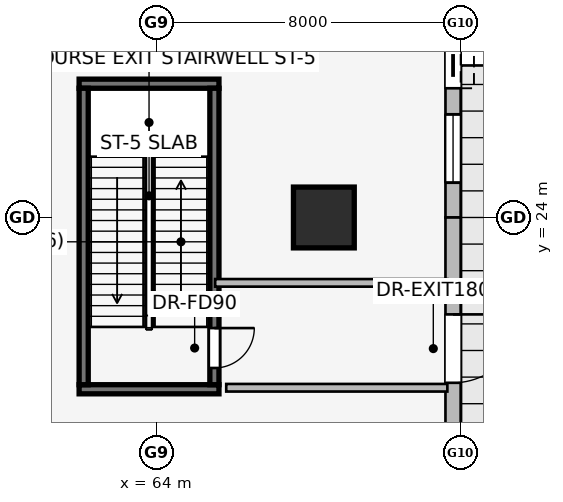
"""IFC4 building model, lengths in metres.
Left out: names, types, materials, properties, quantities, classifications, styles, units other than length and angle.
Written with IfcOpenShell. Run it as: python <this file> out.ifc"""

import sys

from ifc_helpers import new_model, si_unit, direction, frame, frame_2d, origin, origin_2d, place, context, subcontext, project, spatial, rectangle, extrude, element, fill, save


model = new_model("IFC4")
c1 = context("Model", 3, precision=1e-05, world=origin(), true_north=direction((0.0, 1.0)))
c2 = subcontext(c1, "Body", "Model", "MODEL_VIEW")
j1 = project(units=[si_unit("LENGTHUNIT", "METRE"), si_unit("PLANEANGLEUNIT", "RADIAN")], contexts=[c1])
p1 = place(None, origin())
s1 = spatial("IfcSite", under=j1, at=p1, CompositionType="ELEMENT")
p2 = place(p1, origin())
s2 = spatial("IfcBuilding", under=s1, at=p2, CompositionType="ELEMENT")
p3 = place(p2, origin())
s3 = spatial("IfcBuildingStorey", under=s2, at=p3, CompositionType="ELEMENT", Elevation=0.0)
for number, where, z_axis, x_axis in (
    (1, (61.96, 19.48, 0.0), (0.0, 0.0, 1.0), (1.0, 0.0, 0.0)),
    (2, (65.64, 27.52, 0.0), (0.0, 0.0, 1.0), (-1.0, 0.0, 0.0)),
):
    element("IfcWall", number, at=place(p3, frame(where, z_axis=z_axis, x_axis=x_axis)), inside=s3, PredefinedType="SHEAR", context=c2, shape_type="SweptSolid", body=[
        extrude(rectangle(XDim=3.68, YDim=0.24, at=frame_2d((1.84, 0.0))), origin(), (0.0, 0.0, 1.0), 6.0),
    ])
p4 = place(p3, frame((62.08, 27.4, 0.0), z_axis=(0.0, 0.0, 1.0), x_axis=(0.0, -1.0, 0.0)))
e3 = element("IfcWall", 3, at=p4, inside=s3, PredefinedType="SHEAR", context=c2, shape_type="SweptSolid", body=[
    extrude(rectangle(XDim=7.8, YDim=0.24, at=frame_2d((3.9, 0.0))), origin(), (0.0, 0.0, 1.0), 6.0),
])
p5 = place(p3, frame((65.52, 27.4, 0.0), z_axis=(0.0, 0.0, 1.0), x_axis=(0.0, -1.0, 0.0)))
e4 = element("IfcWall", 4, at=p5, inside=s3, PredefinedType="SHEAR", context=c2, shape_type="SweptSolid", body=[
    extrude(rectangle(XDim=7.8, YDim=0.24, at=frame_2d((3.9, 0.0))), origin(), (0.0, 0.0, 1.0), 6.0),
])
p6 = place(p5, frame((6.31, 0.0, 0.0)))
e5 = element("IfcOpeningElement", 5, at=p6, cuts=e4, PredefinedType="OPENING", context=c2, shape_type="SweptSolid", body=[
    extrude(rectangle(XDim=1.05, YDim=2.0, at=frame_2d((0.525, 1.0))), frame((0.0, 0.13, 0.0), z_axis=(0.0, -1.0, 0.0), x_axis=(1.0, 0.0, 0.0)), (0.0, 0.0, 1.0), 0.26),
])
p7 = place(p3, frame((68.4, 24.0, 0.0), z_axis=(0.0, 0.0, 1.0), x_axis=(1.0, 0.0, 0.0)))
e6 = element("IfcColumn", 6, at=p7, inside=s3, PredefinedType="COLUMN", context=c2, shape_type="SweptSolid", body=[
    extrude(rectangle(XDim=1.6, YDim=1.6, at=origin_2d()), origin(), (0.0, 0.0, 1.0), 6.0),
])
p8 = place(p3, frame((71.8, 47.6, 0.0), z_axis=(0.0, 0.0, 1.0), x_axis=(0.0, -1.0, 0.0)))
e7 = element("IfcWall", 7, at=p8, inside=s3, PredefinedType="STANDARD", context=c2, shape_type="SweptSolid", body=[
    extrude(rectangle(XDim=23.6, YDim=0.4, at=frame_2d((11.8, 0.0))), origin(), (0.0, 0.0, 1.0), 5.69),
])
p9 = place(p8, frame((16.6, 0.0, 0.0)))
e8 = element("IfcOpeningElement", 8, at=p9, cuts=e7, PredefinedType="OPENING", context=c2, shape_type="SweptSolid", body=[
    extrude(rectangle(XDim=3.6, YDim=3.6, at=frame_2d((1.8, 1.8))), frame((0.0, 0.21, 0.0), z_axis=(0.0, -1.0, 0.0), x_axis=(1.0, 0.0, 0.0)), (0.0, 0.0, 1.0), 0.42),
])
p10 = place(p8, frame((2.243, 0.0, 0.75)))
e9 = element("IfcOpeningElement", 9, at=p10, cuts=e7, PredefinedType="OPENING", context=c2, shape_type="SweptSolid", body=[
    extrude(rectangle(XDim=2.8, YDim=1.8, at=frame_2d((1.4, 0.9))), frame((0.0, 0.21, 0.0), z_axis=(0.0, -1.0, 0.0), x_axis=(1.0, 0.0, 0.0)), (0.0, 0.0, 1.0), 0.42),
])
p11 = place(p8, frame((6.65, 0.0, 0.75)))
e10 = element("IfcOpeningElement", 10, at=p11, cuts=e7, PredefinedType="OPENING", context=c2, shape_type="SweptSolid", body=[
    extrude(rectangle(XDim=2.8, YDim=1.8, at=frame_2d((1.4, 0.9))), frame((0.0, 0.21, 0.0), z_axis=(0.0, -1.0, 0.0), x_axis=(1.0, 0.0, 0.0)), (0.0, 0.0, 1.0), 0.42),
])
p12 = place(p8, frame((11.057, 0.0, 0.75)))
e11 = element("IfcOpeningElement", 11, at=p12, cuts=e7, PredefinedType="OPENING", context=c2, shape_type="SweptSolid", body=[
    extrude(rectangle(XDim=2.8, YDim=1.8, at=frame_2d((1.4, 0.9))), frame((0.0, 0.21, 0.0), z_axis=(0.0, -1.0, 0.0), x_axis=(1.0, 0.0, 0.0)), (0.0, 0.0, 1.0), 0.42),
])
p13 = place(p8, frame((20.885, 0.0, 0.75)))
e12 = element("IfcOpeningElement", 12, at=p13, cuts=e7, PredefinedType="OPENING", context=c2, shape_type="SweptSolid", body=[
    extrude(rectangle(XDim=1.8, YDim=1.5, at=frame_2d((0.9, 0.75))), frame((0.0, 0.21, 0.0), z_axis=(0.0, -1.0, 0.0), x_axis=(1.0, 0.0, 0.0)), (0.0, 0.0, 1.0), 0.42),
])
p14 = place(p3, frame((71.8, 24.0, 0.0), z_axis=(0.0, 0.0, 1.0), x_axis=(0.0, -1.0, 0.0)))
e13 = element("IfcWall", 13, at=p14, inside=s3, PredefinedType="STANDARD", context=c2, shape_type="SweptSolid", body=[
    extrude(rectangle(XDim=23.6, YDim=0.4, at=frame_2d((11.8, 0.0))), origin(), (0.0, 0.0, 1.0), 5.69),
])
p15 = place(p14, frame((2.55, 0.0, 0.0)))
e14 = element("IfcOpeningElement", 14, at=p15, cuts=e13, PredefinedType="OPENING", context=c2, shape_type="SweptSolid", body=[
    extrude(rectangle(XDim=1.8, YDim=2.3, at=frame_2d((0.9, 1.15))), frame((0.0, 0.21, 0.0), z_axis=(0.0, -1.0, 0.0), x_axis=(1.0, 0.0, 0.0)), (0.0, 0.0, 1.0), 0.42),
])
p16 = place(p14, frame((11.7, 0.0, 0.0)))
e15 = element("IfcOpeningElement", 15, at=p16, cuts=e13, PredefinedType="OPENING", context=c2, shape_type="SweptSolid", body=[
    extrude(rectangle(XDim=3.6, YDim=3.6, at=frame_2d((1.8, 1.8))), frame((0.0, 0.21, 0.0), z_axis=(0.0, -1.0, 0.0), x_axis=(1.0, 0.0, 0.0)), (0.0, 0.0, 1.0), 0.42),
])
p17 = place(p14, frame((5.435, 0.0, 0.75)))
e16 = element("IfcOpeningElement", 16, at=p17, cuts=e13, PredefinedType="OPENING", context=c2, shape_type="SweptSolid", body=[
    extrude(rectangle(XDim=1.05, YDim=1.4, at=frame_2d((0.525, 0.7))), frame((0.0, 0.21, 0.0), z_axis=(0.0, -1.0, 0.0), x_axis=(1.0, 0.0, 0.0)), (0.0, 0.0, 1.0), 0.42),
])
p18 = place(p14, frame((9.26, 0.0, 0.75)))
e17 = element("IfcOpeningElement", 17, at=p18, cuts=e13, PredefinedType="OPENING", context=c2, shape_type="SweptSolid", body=[
    extrude(rectangle(XDim=1.8, YDim=1.5, at=frame_2d((0.9, 0.75))), frame((0.0, 0.21, 0.0), z_axis=(0.0, -1.0, 0.0), x_axis=(1.0, 0.0, 0.0)), (0.0, 0.0, 1.0), 0.42),
])
p19 = place(p14, frame((15.855, 0.0, 0.75)))
e18 = element("IfcOpeningElement", 18, at=p19, cuts=e13, PredefinedType="OPENING", context=c2, shape_type="SweptSolid", body=[
    extrude(rectangle(XDim=2.8, YDim=1.8, at=frame_2d((1.4, 0.9))), frame((0.0, 0.21, 0.0), z_axis=(0.0, -1.0, 0.0), x_axis=(1.0, 0.0, 0.0)), (0.0, 0.0, 1.0), 0.42),
])
p20 = place(p14, frame((19.125, 0.0, 0.75)))
e19 = element("IfcOpeningElement", 19, at=p20, cuts=e13, PredefinedType="OPENING", context=c2, shape_type="SweptSolid", body=[
    extrude(rectangle(XDim=2.8, YDim=1.8, at=frame_2d((1.4, 0.9))), frame((0.0, 0.21, 0.0), z_axis=(0.0, -1.0, 0.0), x_axis=(1.0, 0.0, 0.0)), (0.0, 0.0, 1.0), 0.42),
])
p21 = place(p3, frame((65.831, 19.52, 0.0), z_axis=(0.0, 0.0, 1.0), x_axis=(1.0, 0.0, 0.0)))
e20 = element("IfcWall", 20, at=p21, inside=s3, PredefinedType="PARTITIONING", context=c2, shape_type="SweptSolid", body=[
    extrude(rectangle(XDim=5.819, YDim=0.2, at=frame_2d((2.909, 0.0))), origin(), (0.0, 0.0, 1.0), 5.69),
])
p22 = place(p3, frame((71.65, 22.28, 0.0), z_axis=(0.0, 0.0, 1.0), x_axis=(-1.0, 0.0, 0.0)))
e21 = element("IfcWall", 21, at=p22, inside=s3, PredefinedType="PARTITIONING", context=c2, shape_type="SweptSolid", body=[
    extrude(rectangle(XDim=6.11, YDim=0.2, at=frame_2d((3.055, 0.0))), origin(), (0.0, 0.0, 1.0), 5.69),
])
p23 = place(p9, origin())
e22 = element("IfcDoor", 22, at=p23, inside=s3, OperationType="ROLLINGUP", PredefinedType="GATE", context=c2, shape_type="SweptSolid", body=[
    extrude(rectangle(XDim=3.6, YDim=3.6, at=frame_2d((1.8, 1.8))), frame((0.0, 0.025, 0.0), z_axis=(0.0, -1.0, 0.0), x_axis=(1.0, 0.0, 0.0)), (0.0, 0.0, 1.0), 0.05),
])
fill(e8, e22)
p24 = place(p13, origin())
e23 = element("IfcWindow", 23, at=p24, inside=s3, PartitioningType="SINGLE_PANEL", PredefinedType="WINDOW", context=c2, shape_type="SweptSolid", body=[
    extrude(rectangle(XDim=1.8, YDim=1.5, at=frame_2d((0.9, 0.75))), frame((0.0, 0.03, 0.0), z_axis=(0.0, -1.0, 0.0), x_axis=(1.0, 0.0, 0.0)), (0.0, 0.0, 1.0), 0.06),
])
fill(e12, e23)
p25 = place(p15, origin())
e24 = element("IfcDoor", 24, at=p25, inside=s3, OperationType="SINGLE_SWING_LEFT", PredefinedType="DOOR", context=c2, shape_type="SweptSolid", body=[
    extrude(rectangle(XDim=1.8, YDim=2.3, at=frame_2d((0.9, 1.15))), frame((0.0, 0.025, 0.0), z_axis=(0.0, -1.0, 0.0), x_axis=(1.0, 0.0, 0.0)), (0.0, 0.0, 1.0), 0.05),
])
fill(e14, e24)
p26 = place(p6, origin())
e25 = element("IfcDoor", 25, at=p26, inside=s3, OperationType="SINGLE_SWING_LEFT", PredefinedType="DOOR", context=c2, shape_type="SweptSolid", body=[
    extrude(rectangle(XDim=1.05, YDim=2.0, at=frame_2d((0.525, 1.0))), frame((0.0, 0.025, 0.0), z_axis=(0.0, -1.0, 0.0), x_axis=(1.0, 0.0, 0.0)), (0.0, 0.0, 1.0), 0.05),
])
fill(e5, e25)
save(model, sys.argv[1])
